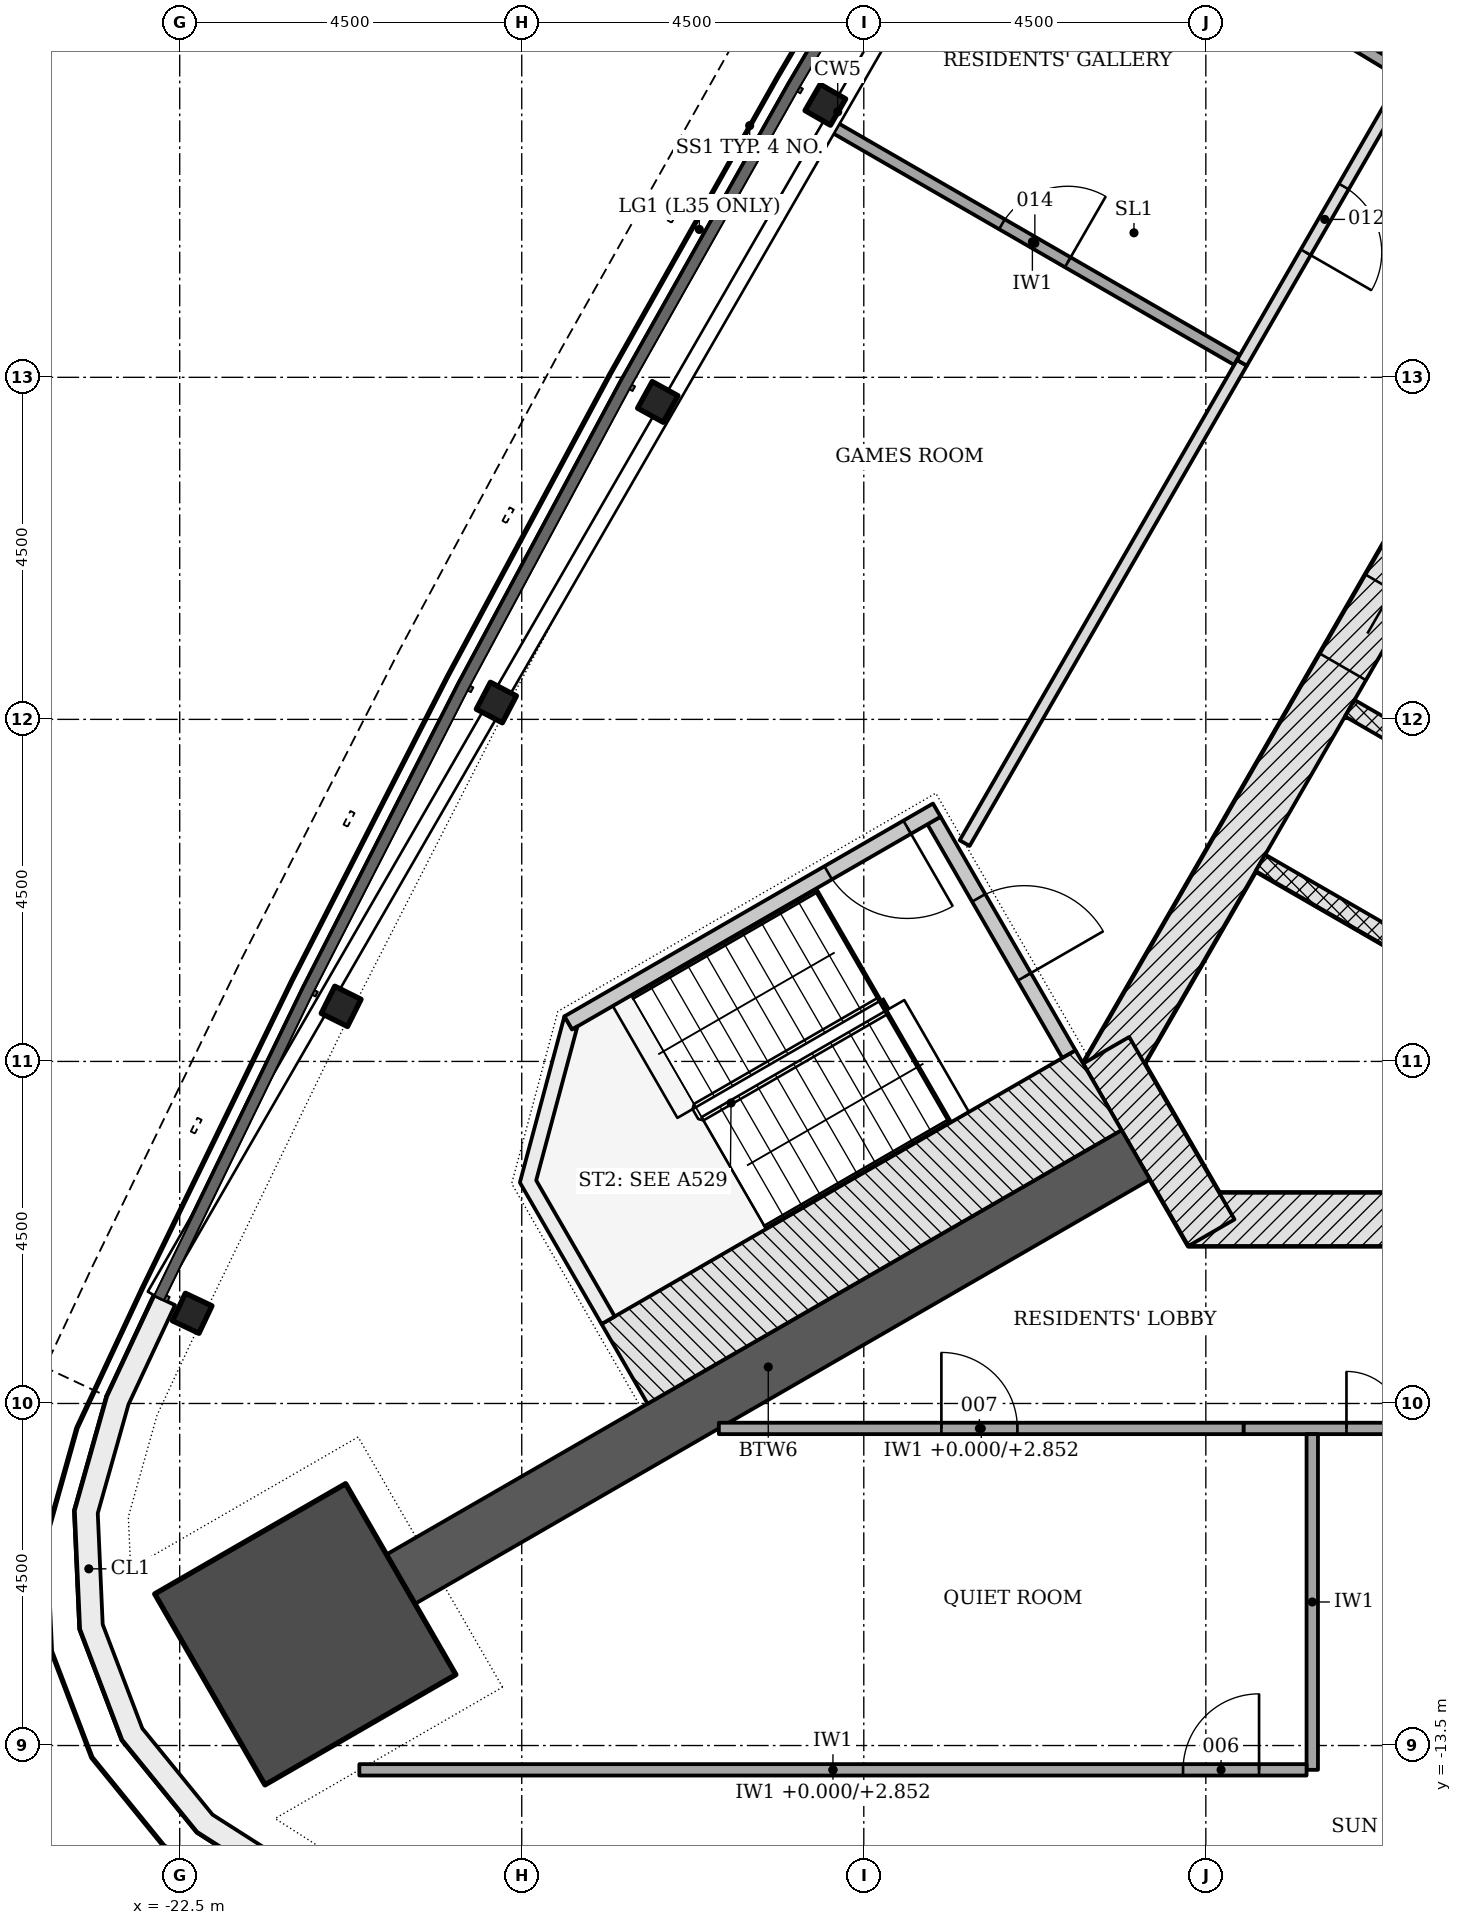
"""IFC4 building model, lengths in metres.
Left out: names, types, materials, properties, quantities, classifications, styles, units other than length and angle.
Written with IfcOpenShell. Run it as: python <this file> out.ifc"""

import sys

from ifc_helpers import new_model, si_unit, direction, frame, frame_2d, origin, origin_2d, place, context, subcontext, project, spatial, polyline, rectangle, i_section, outline, extrude, element, fill, save


model = new_model("IFC4")
c1 = context("Model", 3, precision=1e-05, world=origin(), true_north=direction((0.0, 1.0)))
c2 = subcontext(c1, "Body", "Model", "MODEL_VIEW")
j1 = project(units=[si_unit("LENGTHUNIT", "METRE"), si_unit("PLANEANGLEUNIT", "RADIAN")], contexts=[c1])
p1 = place(None, origin())
s1 = spatial("IfcSite", under=j1, at=p1, CompositionType="ELEMENT")
p2 = place(p1, origin())
s2 = spatial("IfcBuilding", under=s1, at=p2, CompositionType="ELEMENT")
p3 = place(p2, frame((0.0, 0.0, 140.1)))
s3 = spatial("IfcBuildingStorey", under=s2, at=p3, CompositionType="ELEMENT", Elevation=140.1)
p4 = place(p3, frame((-9.229, -6.578, -0.2), z_axis=(0.0, 0.0, 1.0), x_axis=(1.0, 0.0, 0.0)))
e1 = element("IfcWall", 1, at=p4, inside=s3, PredefinedType="SHEAR", context=c2, shape_type="SweptSolid", body=[
    extrude(rectangle(XDim=18.458, YDim=0.7, at=frame_2d((9.229, 0.0))), origin(), (0.0, 0.0, 1.0), 3.6),
])
p5 = place(p4, frame((8.7, 0.0, 0.2)))
e2 = element("IfcOpeningElement", 2, at=p5, cuts=e1, PredefinedType="OPENING", context=c2, shape_type="SweptSolid", body=[
    extrude(rectangle(XDim=1.0, YDim=2.1, at=frame_2d((0.5, 1.05))), frame((0.0, 0.36, 0.0), z_axis=(0.0, -1.0, 0.0), x_axis=(1.0, 0.0, 0.0)), (0.0, 0.0, 1.0), 0.72),
])
p6 = place(p4, frame((3.99, 0.0, 0.2)))
e3 = element("IfcOpeningElement", 3, at=p6, cuts=e1, PredefinedType="OPENING", context=c2, shape_type="SweptSolid", body=[
    extrude(rectangle(XDim=0.9, YDim=2.1, at=frame_2d((0.45, 1.05))), frame((0.0, 0.36, 0.0), z_axis=(0.0, -1.0, 0.0), x_axis=(1.0, 0.0, 0.0)), (0.0, 0.0, 1.0), 0.72),
])
p7 = place(p4, frame((13.489, 0.0, 0.2)))
e4 = element("IfcOpeningElement", 4, at=p7, cuts=e1, PredefinedType="OPENING", context=c2, shape_type="SweptSolid", body=[
    extrude(rectangle(XDim=1.0, YDim=2.1, at=frame_2d((0.5, 1.05))), frame((0.0, 0.36, 0.0), z_axis=(0.0, -1.0, 0.0), x_axis=(1.0, 0.0, 0.0)), (0.0, 0.0, 1.0), 0.72),
])
p8 = place(p3, frame((-1.083, 11.281, -0.2), z_axis=(0.0, 0.0, 1.0), x_axis=(-0.500001446645, -0.866024568562, 0.0)))
e5 = element("IfcWall", 5, at=p8, inside=s3, PredefinedType="SHEAR", context=c2, shape_type="SweptSolid", body=[
    extrude(rectangle(XDim=18.458, YDim=0.7, at=frame_2d((9.229, 0.0))), origin(), (0.0, 0.0, 1.0), 3.6),
])
p9 = place(p8, frame((8.979, 0.0, 0.2)))
e6 = element("IfcOpeningElement", 6, at=p9, cuts=e5, PredefinedType="OPENING", context=c2, shape_type="SweptSolid", body=[
    extrude(rectangle(XDim=1.2, YDim=2.1, at=frame_2d((0.6, 1.05))), frame((0.0, 0.36, 0.0), z_axis=(0.0, -1.0, 0.0), x_axis=(1.0, 0.0, 0.0)), (0.0, 0.0, 1.0), 0.72),
])
p10 = place(p8, frame((11.029, 0.0, 0.2)))
e7 = element("IfcOpeningElement", 7, at=p10, cuts=e5, PredefinedType="OPENING", context=c2, shape_type="SweptSolid", body=[
    extrude(rectangle(XDim=1.2, YDim=2.1, at=frame_2d((0.6, 1.05))), frame((0.0, 0.36, 0.0), z_axis=(0.0, -1.0, 0.0), x_axis=(1.0, 0.0, 0.0)), (0.0, 0.0, 1.0), 0.72),
])
p11 = place(p3, frame((-10.311, -4.353, -0.2), z_axis=(0.0, 0.0, 1.0), x_axis=(0.500042739161, -0.866000726912, 0.0)))
e8 = element("IfcWall", 8, at=p11, inside=s3, PredefinedType="SHEAR", context=c2, shape_type="SweptSolid", body=[
    extrude(rectangle(XDim=2.771, YDim=0.7, at=frame_2d((1.386, 0.0))), origin(), (0.0, 0.0, 1.0), 3.6),
])
p12 = place(p3, frame((-9.922, -5.728, -0.2), z_axis=(0.0, 0.0, 1.0), x_axis=(-0.866023928423, -0.500002555393, 0.0)))
e9 = element("IfcWall", 9, at=p12, inside=s3, PredefinedType="SHEAR", context=c2, shape_type="SweptSolid", body=[
    extrude(rectangle(XDim=11.167, YDim=0.75, at=frame_2d((5.583, 0.0))), origin(), (0.0, 0.0, 1.0), 3.6),
])
p13 = place(p3, frame((-20.848, -12.037, -0.2), z_axis=(0.0, 0.0, 1.0), x_axis=(-0.866025403784, -0.5, 0.0)))
e10 = element("IfcColumn", 10, at=p13, inside=s3, PredefinedType="COLUMN", context=c2, shape_type="SweptSolid", body=[
    extrude(rectangle(XDim=2.9, YDim=2.9, at=origin_2d()), origin(), (0.0, 0.0, 1.0), 3.6),
])
for number, where, z_axis, x_axis in (
    (11, (-14.006, 8.086, -0.2), (0.0, 0.0, 1.0), (-0.5, -0.866, 0.0)),
    (12, (-16.21, 4.176, -0.2), (0.0, 0.0, 1.0), (-0.482, -0.876, 0.0)),
    (13, (-18.334, 0.222, -0.2), (0.0, 0.0, 1.0), (-0.464, -0.886, 0.0)),
    (14, (-20.376, -3.775, -0.2), (0.0, 0.0, 1.0), (-0.446, -0.895, 0.0)),
    (15, (-22.336, -7.814, -0.2), (0.0, 0.0, 1.0), (-0.427, -0.904, 0.0)),
):
    element("IfcColumn", number, at=place(p3, frame(where, z_axis=z_axis, x_axis=x_axis)), inside=s3, PredefinedType="COLUMN", context=c2, shape_type="SweptSolid", body=[
        extrude(i_section(OverallWidth=0.399, OverallDepth=0.386, WebThickness=0.021, FlangeThickness=0.033, FilletRadius=0.015, at=origin_2d()), origin(), (0.0, 0.0, 1.0), 3.6),
    ])
p14 = place(p3, origin())
e16 = element("IfcWall", 16, at=p14, inside=s3, PredefinedType="NOTDEFINED", context=c2, shape_type="SweptSolid", body=[
    extrude(outline(polyline([(-22.833, -7.579), (-23.456, -8.907), (-23.88, -10.409), (-23.811, -11.968), (-23.255, -13.427), (-22.27, -14.636), (-20.955, -15.476), (-19.442, -15.86), (-17.98, -15.985), (-17.954, -15.686), (-19.392, -15.563), (-20.834, -15.197), (-22.068, -14.41), (-22.992, -13.275), (-23.513, -11.906), (-23.578, -10.444), (-23.174, -9.012), (-22.562, -7.706), (-22.833, -7.579)])), origin(), (0.0, 0.0, 1.0), 3.3),
])
for number, where, z_axis, x_axis in (
    (17, (-7.106, 0.148, -0.2), (0.0, 0.0, 1.0), (0.866, -0.5, 0.0)),
    (18, (-8.281, -1.887, -0.2), (0.0, 0.0, 1.0), (0.866, -0.5, 0.0)),
):
    element("IfcWall", number, at=place(p3, frame(where, z_axis=z_axis, x_axis=x_axis)), inside=s3, PredefinedType="PARTITIONING", context=c2, shape_type="SweptSolid", body=[
        extrude(rectangle(XDim=2.9, YDim=0.25, at=frame_2d((1.45, 0.0))), origin(), (0.0, 0.0, 1.0), 3.6),
    ])
p15 = place(p3, frame((-12.576, -1.331, -0.2), z_axis=(0.0, 0.0, 1.0), x_axis=(0.499970499736, -0.8660424351, 0.0)))
e19 = element("IfcWall", 19, at=p15, inside=s3, PredefinedType="SHEAR", context=c2, shape_type="SweptSolid", body=[
    extrude(rectangle(XDim=3.55, YDim=0.2, at=frame_2d((1.775, 0.0))), origin(), (0.0, 0.0, 1.0), 3.6),
])
p16 = place(p15, frame((1.175, 0.0, 0.2)))
e20 = element("IfcOpeningElement", 20, at=p16, cuts=e19, PredefinedType="OPENING", context=c2, shape_type="SweptSolid", body=[
    extrude(rectangle(XDim=1.2, YDim=2.1, at=frame_2d((0.6, 1.05))), frame((0.0, 0.11, 0.0), z_axis=(0.0, -1.0, 0.0), x_axis=(1.0, 0.0, 0.0)), (0.0, 0.0, 1.0), 0.22),
])
p17 = place(p3, frame((-12.539, -1.194, -0.2), z_axis=(0.0, 0.0, 1.0), x_axis=(-0.866045472092, -0.499965239061, 0.0)))
e21 = element("IfcWall", 21, at=p17, inside=s3, PredefinedType="SHEAR", context=c2, shape_type="SweptSolid", body=[
    extrude(rectangle(XDim=5.6, YDim=0.2, at=frame_2d((2.8, 0.0))), origin(), (0.0, 0.0, 1.0), 3.6),
])
p18 = place(p17, frame((0.45, 0.0, 0.2)))
e22 = element("IfcOpeningElement", 22, at=p18, cuts=e21, PredefinedType="OPENING", context=c2, shape_type="SweptSolid", body=[
    extrude(rectangle(XDim=1.2, YDim=2.1, at=frame_2d((0.6, 1.05))), frame((0.0, 0.11, 0.0), z_axis=(0.0, -1.0, 0.0), x_axis=(1.0, 0.0, 0.0)), (0.0, 0.0, 1.0), 0.22),
])
p19 = place(p3, frame((-10.412, -4.879, -0.2), z_axis=(0.0, 0.0, 1.0), x_axis=(-0.866026919366, -0.499997374926, 0.0)))
e23 = element("IfcWall", 23, at=p19, inside=s3, PredefinedType="SHEAR", context=c2, shape_type="SweptSolid", body=[
    extrude(rectangle(XDim=7.2, YDim=1.211, at=frame_2d((3.6, 0.0))), origin(), (0.0, 0.0, 1.0), 3.6),
])
p20 = place(p3, frame((0.0, 0.0, -0.2)))
e24 = element("IfcWall", 24, at=p20, inside=s3, PredefinedType="SHEAR", context=c2, shape_type="SweptSolid", body=[
    extrude(outline(polyline([(-17.439, -3.907), (-18.025, -6.093), (-16.95, -7.955), (-16.777, -7.855), (-17.81, -6.065), (-17.267, -4.039), (-17.339, -4.081), (-17.339, -4.081), (-17.339, -4.081), (-17.339, -4.081), (-17.339, -4.081), (-17.339, -4.081), (-17.339, -4.081), (-17.339, -4.081), (-17.339, -4.081), (-17.339, -4.081), (-17.339, -4.081), (-17.339, -4.081), (-17.339, -4.081), (-17.339, -4.081), (-17.339, -4.081), (-17.339, -4.081), (-17.339, -4.081), (-17.439, -3.907)])), origin(), (0.0, 0.0, 1.0), 3.6),
])
p21 = place(p3, frame((-15.407, -9.328, 0.0), z_axis=(0.0, 0.0, 1.0), x_axis=(1.0, 0.0, 0.0)))
e25 = element("IfcWall", 25, at=p21, inside=s3, PredefinedType="PARTITIONING", context=c2, shape_type="SweptSolid", body=[
    extrude(rectangle(XDim=6.906, YDim=0.15, at=frame_2d((3.453, 0.0))), origin(), (0.0, 0.0, 1.0), 2.852),
])
p22 = place(p21, frame((2.928, 0.0, 0.0)))
e26 = element("IfcOpeningElement", 26, at=p22, cuts=e25, PredefinedType="OPENING", context=c2, shape_type="SweptSolid", body=[
    extrude(rectangle(XDim=1.0, YDim=2.1, at=frame_2d((0.5, 1.05))), frame((0.0, 0.085, 0.0), z_axis=(0.0, -1.0, 0.0), x_axis=(1.0, 0.0, 0.0)), (0.0, 0.0, 1.0), 0.17),
])
p23 = place(p3, frame((-8.501, -9.328, 0.0), z_axis=(0.0, 0.0, 1.0), x_axis=(1.0, 0.0, 0.0)))
e27 = element("IfcWall", 27, at=p23, inside=s3, PredefinedType="PARTITIONING", context=c2, shape_type="SweptSolid", body=[
    extrude(rectangle(XDim=4.353, YDim=0.15, at=frame_2d((2.176, 0.0))), origin(), (0.0, 0.0, 1.0), 2.847),
])
p24 = place(p23, frame((1.352, 0.0, 0.0)))
e28 = element("IfcOpeningElement", 28, at=p24, cuts=e27, PredefinedType="OPENING", context=c2, shape_type="SweptSolid", body=[
    extrude(rectangle(XDim=1.5, YDim=2.1, at=frame_2d((0.75, 1.05))), frame((0.0, 0.085, 0.0), z_axis=(0.0, -1.0, 0.0), x_axis=(1.0, 0.0, 0.0)), (0.0, 0.0, 1.0), 0.17),
])
p25 = place(p3, frame((-7.6, -9.403, 0.0), z_axis=(0.0, 0.0, 1.0), x_axis=(0.0, -1.0, 0.0)))
e29 = element("IfcWall", 29, at=p25, inside=s3, PredefinedType="PARTITIONING", context=c2, shape_type="SweptSolid", body=[
    extrude(rectangle(XDim=4.417, YDim=0.15, at=frame_2d((2.208, 0.0))), origin(), (0.0, 0.0, 1.0), 3.4),
])
p26 = place(p3, frame((-20.136, -13.82, 0.0), z_axis=(0.0, 0.0, 1.0), x_axis=(1.0, 0.0, 0.0)))
e30 = element("IfcWall", 30, at=p26, inside=s3, PredefinedType="PARTITIONING", context=c2, shape_type="SweptSolid", body=[
    extrude(rectangle(XDim=12.462, YDim=0.15, at=frame_2d((6.231, 0.0))), origin(), (0.0, 0.0, 1.0), 2.852),
])
p27 = place(p26, frame((10.837, 0.0, 0.0)))
e31 = element("IfcOpeningElement", 31, at=p27, cuts=e30, PredefinedType="OPENING", context=c2, shape_type="SweptSolid", body=[
    extrude(rectangle(XDim=1.0, YDim=2.1, at=frame_2d((0.5, 1.05))), frame((0.0, 0.085, 0.0), z_axis=(0.0, -1.0, 0.0), x_axis=(1.0, 0.0, 0.0)), (0.0, 0.0, 1.0), 0.17),
])
p28 = place(p3, frame((-8.525, 4.691, 0.0), z_axis=(0.0, 0.0, 1.0), x_axis=(-0.499986021771, -0.866033473968, 0.0)))
e32 = element("IfcWall", 32, at=p28, inside=s3, PredefinedType="PARTITIONING", context=c2, shape_type="SweptSolid", body=[
    extrude(rectangle(XDim=7.297, YDim=0.15, at=frame_2d((3.648, 0.0))), origin(), (0.0, 0.0, 1.0), 2.847),
])
p29 = place(p3, frame((-11.695, 11.7, 0.0), z_axis=(0.0, 0.0, 1.0), x_axis=(0.855596827578, -0.517642800238, 0.0)))
e33 = element("IfcWall", 33, at=p29, inside=s3, PredefinedType="PARTITIONING", context=c2, shape_type="SweptSolid", body=[
    extrude(rectangle(XDim=6.177, YDim=0.15, at=frame_2d((3.088, 0.0))), origin(), (0.0, 0.0, 1.0), 3.4),
])
p30 = place(p29, frame((2.626, 0.0, 0.0)))
e34 = element("IfcOpeningElement", 34, at=p30, cuts=e33, PredefinedType="OPENING", context=c2, shape_type="SweptSolid", body=[
    extrude(rectangle(XDim=1.0, YDim=2.1, at=frame_2d((0.5, 1.05))), frame((0.0, 0.085, 0.0), z_axis=(0.0, -1.0, 0.0), x_axis=(1.0, 0.0, 0.0)), (0.0, 0.0, 1.0), 0.17),
])
p31 = place(p3, frame((-13.974, 7.837, 0.0), z_axis=(0.0, 0.0, 1.0), x_axis=(0.866040415161, -0.499973998632, 0.0)))
e35 = element("IfcWall", 35, at=p31, inside=s3, PredefinedType="PARTITIONING", context=c2, shape_type="SweptSolid", body=[
    extrude(rectangle(XDim=6.217, YDim=0.15, at=frame_2d((3.108, 0.0))), origin(), (0.0, 0.0, 1.0), 3.4),
])
p32 = place(p31, frame((2.646, 0.0, 0.0)))
e36 = element("IfcOpeningElement", 36, at=p32, cuts=e35, PredefinedType="OPENING", context=c2, shape_type="SweptSolid", body=[
    extrude(rectangle(XDim=1.0, YDim=2.1, at=frame_2d((0.5, 1.05))), frame((0.0, 0.085, 0.0), z_axis=(0.0, -1.0, 0.0), x_axis=(1.0, 0.0, 0.0)), (0.0, 0.0, 1.0), 0.17),
])
p33 = place(p3, frame((-6.346, 8.464, 0.0), z_axis=(0.0, 0.0, 1.0), x_axis=(-0.50001992892, -0.866013897511, 0.0)))
e37 = element("IfcWall", 37, at=p33, inside=s3, PredefinedType="PARTITIONING", context=c2, shape_type="SweptSolid", body=[
    extrude(rectangle(XDim=4.357, YDim=0.15, at=frame_2d((2.179, 0.0))), origin(), (0.0, 0.0, 1.0), 2.847),
])
p34 = place(p33, frame((1.678, 0.0, 0.0)))
e38 = element("IfcOpeningElement", 38, at=p34, cuts=e37, PredefinedType="OPENING", context=c2, shape_type="SweptSolid", body=[
    extrude(rectangle(XDim=1.0, YDim=2.1, at=frame_2d((0.5, 1.05))), frame((0.0, 0.085, 0.0), z_axis=(0.0, -1.0, 0.0), x_axis=(1.0, 0.0, 0.0)), (0.0, 0.0, 1.0), 0.17),
])
p35 = place(p10, origin())
e39 = element("IfcDoor", 39, at=p35, inside=s3, OperationType="DOUBLE_DOOR_SLIDING", PredefinedType="DOOR", context=c2, shape_type="SweptSolid", body=[
    extrude(rectangle(XDim=1.2, YDim=2.1, at=frame_2d((0.6, 1.05))), frame((0.0, 0.025, 0.0), z_axis=(0.0, -1.0, 0.0), x_axis=(1.0, 0.0, 0.0)), (0.0, 0.0, 1.0), 0.05),
])
fill(e7, e39)
p36 = place(p16, origin())
e40 = element("IfcDoor", 40, at=p36, inside=s3, OperationType="SINGLE_SWING_RIGHT", PredefinedType="DOOR", context=c2, shape_type="SweptSolid", body=[
    extrude(rectangle(XDim=1.2, YDim=2.1, at=frame_2d((0.6, 1.05))), frame((0.0, 0.025, 0.0), z_axis=(0.0, -1.0, 0.0), x_axis=(1.0, 0.0, 0.0)), (0.0, 0.0, 1.0), 0.05),
])
fill(e20, e40)
p37 = place(p18, origin())
e41 = element("IfcDoor", 41, at=p37, inside=s3, OperationType="SINGLE_SWING_LEFT", PredefinedType="DOOR", context=c2, shape_type="SweptSolid", body=[
    extrude(rectangle(XDim=1.2, YDim=2.1, at=frame_2d((0.6, 1.05))), frame((0.0, 0.025, 0.0), z_axis=(0.0, -1.0, 0.0), x_axis=(1.0, 0.0, 0.0)), (0.0, 0.0, 1.0), 0.05),
])
fill(e22, e41)
p38 = place(p24, origin())
e42 = element("IfcDoor", 42, at=p38, inside=s3, OperationType="DOUBLE_DOOR_SINGLE_SWING", PredefinedType="DOOR", context=c2, shape_type="SweptSolid", body=[
    extrude(rectangle(XDim=1.5, YDim=2.1, at=frame_2d((0.75, 1.05))), frame((0.0, 0.025, 0.0), z_axis=(0.0, -1.0, 0.0), x_axis=(1.0, 0.0, 0.0)), (0.0, 0.0, 1.0), 0.05),
])
fill(e28, e42)
p39 = place(p27, origin())
e43 = element("IfcDoor", 43, at=p39, inside=s3, OperationType="SINGLE_SWING_RIGHT", PredefinedType="DOOR", context=c2, shape_type="SweptSolid", body=[
    extrude(rectangle(XDim=1.0, YDim=2.1, at=frame_2d((0.5, 1.05))), frame((0.0, 0.025, 0.0), z_axis=(0.0, -1.0, 0.0), x_axis=(1.0, 0.0, 0.0)), (0.0, 0.0, 1.0), 0.05),
])
fill(e31, e43)
p40 = place(p22, origin())
e44 = element("IfcDoor", 44, at=p40, inside=s3, OperationType="SINGLE_SWING_LEFT", PredefinedType="DOOR", context=c2, shape_type="SweptSolid", body=[
    extrude(rectangle(XDim=1.0, YDim=2.1, at=frame_2d((0.5, 1.05))), frame((0.0, 0.025, 0.0), z_axis=(0.0, -1.0, 0.0), x_axis=(1.0, 0.0, 0.0)), (0.0, 0.0, 1.0), 0.05),
])
fill(e26, e44)
p41 = place(p34, origin())
e45 = element("IfcDoor", 45, at=p41, inside=s3, OperationType="SINGLE_SWING_RIGHT", PredefinedType="DOOR", context=c2, shape_type="SweptSolid", body=[
    extrude(rectangle(XDim=1.0, YDim=2.1, at=frame_2d((0.5, 1.05))), frame((0.0, 0.025, 0.0), z_axis=(0.0, -1.0, 0.0), x_axis=(1.0, 0.0, 0.0)), (0.0, 0.0, 1.0), 0.05),
])
fill(e38, e45)
p42 = place(p32, origin())
e46 = element("IfcDoor", 46, at=p42, inside=s3, OperationType="SINGLE_SWING_RIGHT", PredefinedType="DOOR", context=c2, shape_type="SweptSolid", body=[
    extrude(rectangle(XDim=1.0, YDim=2.1, at=frame_2d((0.5, 1.05))), frame((0.0, 0.025, 0.0), z_axis=(0.0, -1.0, 0.0), x_axis=(1.0, 0.0, 0.0)), (0.0, 0.0, 1.0), 0.05),
])
fill(e36, e46)
save(model, sys.argv[1])
